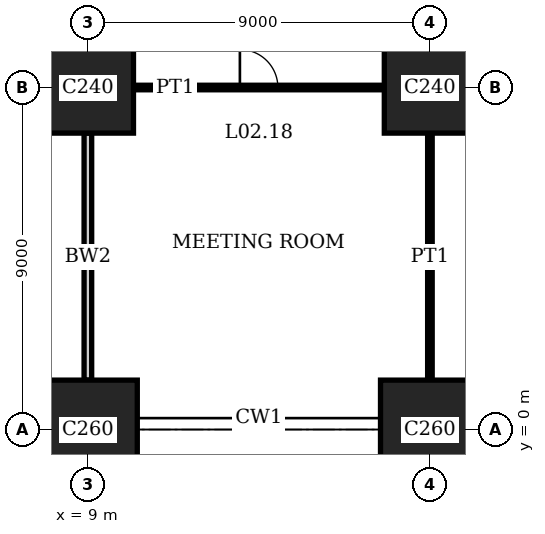
"""IFC4 building model, lengths in metres.
Left out: names, types, materials, properties, quantities, classifications, styles, units other than length and angle.
Written with IfcOpenShell. Run it as: python <this file> out.ifc"""

import sys

from ifc_helpers import new_model, si_unit, direction, frame, frame_2d, origin, origin_2d, place, context, subcontext, project, spatial, rectangle, extrude, element, fill, save


model = new_model("IFC4")
c1 = context("Model", 3, precision=1e-05, world=origin(), true_north=direction((0.0, 1.0)))
c2 = subcontext(c1, "Body", "Model", "MODEL_VIEW")
j1 = project(units=[si_unit("LENGTHUNIT", "METRE"), si_unit("PLANEANGLEUNIT", "RADIAN")], contexts=[c1])
p1 = place(None, origin())
s1 = spatial("IfcSite", under=j1, at=p1, CompositionType="ELEMENT")
p2 = place(p1, origin())
s2 = spatial("IfcBuilding", under=s1, at=p2, CompositionType="ELEMENT")
p3 = place(p2, frame((0.0, 0.0, 10.8)))
s3 = spatial("IfcBuildingStorey", under=s2, at=p3, CompositionType="ELEMENT", Elevation=10.8)
p4 = place(p3, frame((9.0, 0.0, 0.0), z_axis=(0.0, 0.0, 1.0), x_axis=(1.0, 0.0, 0.0)))
e1 = element("IfcColumn", 1, at=p4, inside=s3, PredefinedType="COLUMN", context=c2, shape_type="SweptSolid", body=[
    extrude(rectangle(XDim=2.6, YDim=2.6, at=origin_2d()), origin(), (0.0, 0.0, 1.0), 5.0),
])
p5 = place(p3, frame((9.0, 9.0, 0.0), z_axis=(0.0, 0.0, 1.0), x_axis=(1.0, 0.0, 0.0)))
e2 = element("IfcColumn", 2, at=p5, inside=s3, PredefinedType="COLUMN", context=c2, shape_type="SweptSolid", body=[
    extrude(rectangle(XDim=2.4, YDim=2.4, at=origin_2d()), origin(), (0.0, 0.0, 1.0), 5.0),
])
p6 = place(p3, frame((18.0, 0.0, 0.0), z_axis=(0.0, 0.0, 1.0), x_axis=(1.0, 0.0, 0.0)))
e3 = element("IfcColumn", 3, at=p6, inside=s3, PredefinedType="COLUMN", context=c2, shape_type="SweptSolid", body=[
    extrude(rectangle(XDim=2.6, YDim=2.6, at=origin_2d()), origin(), (0.0, 0.0, 1.0), 5.0),
])
p7 = place(p3, frame((18.0, 9.0, 0.0), z_axis=(0.0, 0.0, 1.0), x_axis=(1.0, 0.0, 0.0)))
e4 = element("IfcColumn", 4, at=p7, inside=s3, PredefinedType="COLUMN", context=c2, shape_type="SweptSolid", body=[
    extrude(rectangle(XDim=2.4, YDim=2.4, at=origin_2d()), origin(), (0.0, 0.0, 1.0), 5.0),
])
p8 = place(p3, frame((9.0, 1.3, 0.0), z_axis=(0.0, 0.0, 1.0), x_axis=(0.0, 1.0, 0.0)))
e5 = element("IfcWall", 5, at=p8, inside=s3, PredefinedType="SOLIDWALL", context=c2, shape_type="SweptSolid", body=[
    extrude(rectangle(XDim=6.5, YDim=0.2, at=frame_2d((3.25, 0.0))), origin(), (0.0, 0.0, 1.0), 3.8),
])
p9 = place(p3, frame((10.2, 9.0, 0.0), z_axis=(0.0, 0.0, 1.0), x_axis=(1.0, 0.0, 0.0)))
e6 = element("IfcWall", 6, at=p9, inside=s3, PredefinedType="PARTITIONING", context=c2, shape_type="SweptSolid", body=[
    extrude(rectangle(XDim=6.6, YDim=0.12, at=frame_2d((3.3, 0.0))), origin(), (0.0, 0.0, 1.0), 3.8),
])
p10 = place(p9, frame((2.8, 0.0, 0.0)))
e7 = element("IfcOpeningElement", 7, at=p10, cuts=e6, PredefinedType="OPENING", context=c2, shape_type="SweptSolid", body=[
    extrude(rectangle(XDim=1.0, YDim=2.4, at=frame_2d((0.5, 1.2))), frame((0.0, 0.07, 0.0), z_axis=(0.0, -1.0, 0.0), x_axis=(1.0, 0.0, 0.0)), (0.0, 0.0, 1.0), 0.14),
])
p11 = place(p3, frame((18.0, 1.3, 0.0), z_axis=(0.0, 0.0, 1.0), x_axis=(0.0, 1.0, 0.0)))
e8 = element("IfcWall", 8, at=p11, inside=s3, PredefinedType="PARTITIONING", context=c2, shape_type="SweptSolid", body=[
    extrude(rectangle(XDim=6.5, YDim=0.12, at=frame_2d((3.25, 0.0))), origin(), (0.0, 0.0, 1.0), 3.8),
])
p12 = place(p10, origin())
e9 = element("IfcDoor", 9, at=p12, inside=s3, OperationType="SINGLE_SWING_RIGHT", PredefinedType="DOOR", context=c2, shape_type="SweptSolid", body=[
    extrude(rectangle(XDim=1.0, YDim=2.4, at=frame_2d((0.5, 1.2))), frame((0.0, 0.025, 0.0), z_axis=(0.0, -1.0, 0.0), x_axis=(1.0, 0.0, 0.0)), (0.0, 0.0, 1.0), 0.05),
])
fill(e7, e9)
save(model, sys.argv[1])
